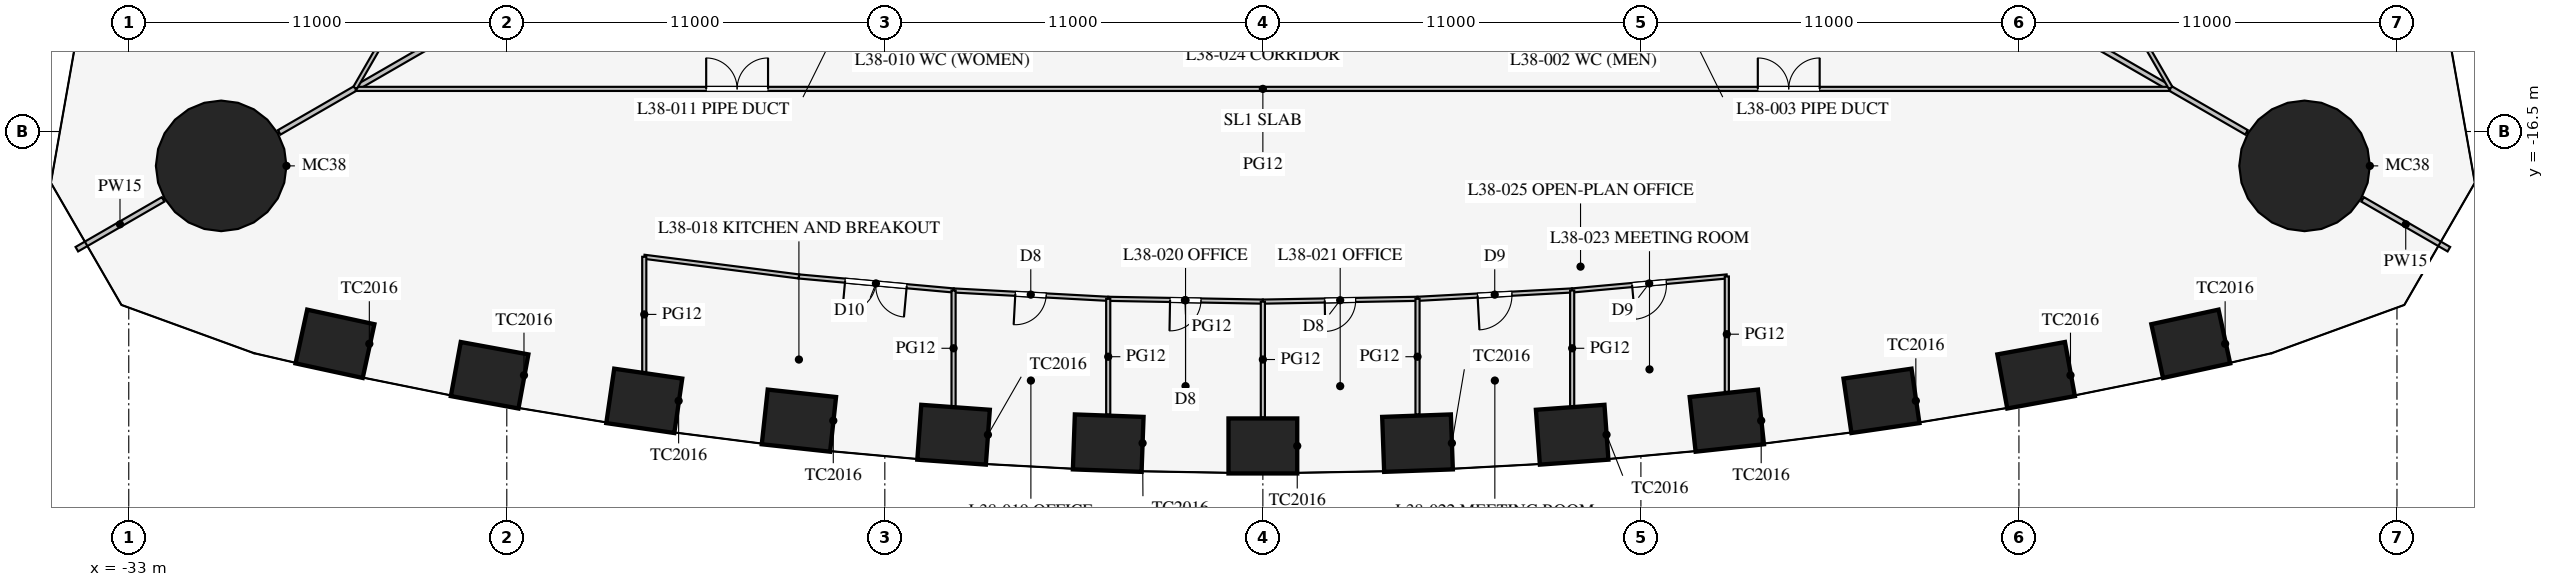
"""IFC4 building model, lengths in metres.
Left out: names, types, materials, properties, quantities, classifications, styles, units other than length and angle.
Written with IfcOpenShell. Run it as: python <this file> out.ifc"""

import sys

from ifc_helpers import new_model, si_unit, direction, frame, frame_2d, origin, origin_2d, place, context, subcontext, project, spatial, rectangle, circle, extrude, element, fill, save


model = new_model("IFC4")
c1 = context("Model", 3, precision=1e-05, world=origin(), true_north=direction((0.0, 1.0)))
c2 = subcontext(c1, "Body", "Model", "MODEL_VIEW")
j1 = project(units=[si_unit("LENGTHUNIT", "METRE"), si_unit("PLANEANGLEUNIT", "RADIAN")], contexts=[c1])
p1 = place(None, origin())
s1 = spatial("IfcSite", under=j1, at=p1, CompositionType="ELEMENT")
p2 = place(p1, origin())
s2 = spatial("IfcBuilding", under=s1, at=p2, CompositionType="ELEMENT")
p3 = place(p2, frame((0.0, 0.0, 166.1)))
s3 = spatial("IfcBuildingStorey", under=s2, at=p3, CompositionType="ELEMENT", Elevation=166.1)
for number, where, z_axis, x_axis in (
    (1, (-27.0, -22.677, 0.0), (0.0, 0.0, 1.0), (0.977, -0.212, 0.0)),
    (2, (-22.5, -23.593, 0.0), (0.0, 0.0, 1.0), (0.984, -0.18, 0.0)),
    (3, (-18.0, -24.337, 0.0), (0.0, 0.0, 1.0), (0.99, -0.144, 0.0)),
    (4, (-13.5, -24.913, 0.0), (0.0, 0.0, 1.0), (0.994, -0.108, 0.0)),
    (5, (-9.0, -25.323, 0.0), (0.0, 0.0, 1.0), (0.997, -0.072, 0.0)),
    (6, (-4.5, -25.568, 0.0), (0.0, 0.0, 1.0), (0.999, -0.036, 0.0)),
    (7, (0.0, -25.65, 0.0), (0.0, 0.0, 1.0), (1.0, 0.0, 0.0)),
    (8, (4.5, -25.568, 0.0), (0.0, 0.0, 1.0), (0.999, 0.036, 0.0)),
    (9, (9.0, -25.323, 0.0), (0.0, 0.0, 1.0), (0.997, 0.072, 0.0)),
    (10, (13.5, -24.913, 0.0), (0.0, 0.0, 1.0), (0.994, 0.108, 0.0)),
    (11, (18.0, -24.337, 0.0), (0.0, 0.0, 1.0), (0.99, 0.144, 0.0)),
    (12, (22.5, -23.593, 0.0), (0.0, 0.0, 1.0), (0.984, 0.18, 0.0)),
    (13, (27.0, -22.677, 0.0), (0.0, 0.0, 1.0), (0.977, 0.212, 0.0)),
):
    element("IfcColumn", number, at=place(p3, frame(where, z_axis=z_axis, x_axis=x_axis)), inside=s3, PredefinedType="COLUMN", context=c2, shape_type="SweptSolid", body=[
        extrude(rectangle(XDim=2.0, YDim=1.6, at=origin_2d()), origin(), (0.0, 0.0, 1.0), 4.2),
    ])
for number, where, z_axis, x_axis in (
    (14, (30.311, -17.5, 0.0), (0.0, 0.0, 1.0), (1.0, 0.0, 0.0)),
    (15, (-30.311, -17.5, 0.0), (0.0, 0.0, 1.0), (1.0, 0.0, 0.0)),
):
    element("IfcColumn", number, at=place(p3, frame(where, z_axis=z_axis, x_axis=x_axis)), inside=s3, PredefinedType="COLUMN", context=c2, shape_type="SweptSolid", body=[
        extrude(circle(Radius=1.9, at=origin_2d()), origin(), (0.0, 0.0, 1.0), 4.2),
    ])
p4 = place(p3, frame((14.203, -8.2, 0.0), z_axis=(0.0, 0.0, 1.0), x_axis=(0.866024668836, -0.500001272966, 0.0)))
e16 = element("IfcWall", 16, at=p4, inside=s3, PredefinedType="PARTITIONING", context=c2, shape_type="SweptSolid", body=[
    extrude(rectangle(XDim=16.65, YDim=0.15, at=frame_2d((8.325, 0.0))), origin(), (0.0, 0.0, 1.0), 2.3),
])
p5 = place(p3, frame((32.0, -18.475, 0.0), z_axis=(0.0, 0.0, 1.0), x_axis=(0.866042548026, -0.499970304126, 0.0)))
e17 = element("IfcWall", 17, at=p5, inside=s3, PredefinedType="PARTITIONING", context=c2, shape_type="SweptSolid", body=[
    extrude(rectangle(XDim=2.899, YDim=0.15, at=frame_2d((1.45, 0.0))), origin(), (0.0, 0.0, 1.0), 2.3),
])
p6 = place(p3, frame((-14.203, -8.2, 0.0), z_axis=(0.0, 0.0, 1.0), x_axis=(-0.866024668836, -0.500001272966, 0.0)))
e18 = element("IfcWall", 18, at=p6, inside=s3, PredefinedType="PARTITIONING", context=c2, shape_type="SweptSolid", body=[
    extrude(rectangle(XDim=16.65, YDim=0.15, at=frame_2d((8.325, 0.0))), origin(), (0.0, 0.0, 1.0), 2.3),
])
p7 = place(p3, frame((-32.0, -18.475, 0.0), z_axis=(0.0, 0.0, 1.0), x_axis=(-0.866042548026, -0.499970304126, 0.0)))
e19 = element("IfcWall", 19, at=p7, inside=s3, PredefinedType="PARTITIONING", context=c2, shape_type="SweptSolid", body=[
    extrude(rectangle(XDim=2.899, YDim=0.15, at=frame_2d((1.45, 0.0))), origin(), (0.0, 0.0, 1.0), 2.3),
])
p8 = place(p3, frame((-26.398, -15.26, 0.0), z_axis=(0.0, 0.0, 1.0), x_axis=(1.0, 0.0, 0.0)))
e20 = element("IfcWall", 20, at=p8, inside=s3, PredefinedType="PARTITIONING", context=c2, shape_type="SweptSolid", body=[
    extrude(rectangle(XDim=52.796, YDim=0.12, at=frame_2d((26.398, 0.0))), origin(), (0.0, 0.0, 1.0), 2.9),
])
p9 = place(p8, frame((10.2, 0.0, 0.15)))
e21 = element("IfcOpeningElement", 21, at=p9, cuts=e20, PredefinedType="OPENING", context=c2, shape_type="SweptSolid", body=[
    extrude(rectangle(XDim=1.8, YDim=2.1, at=frame_2d((0.9, 1.05))), frame((0.0, 0.07, 0.0), z_axis=(0.0, -1.0, 0.0), x_axis=(1.0, 0.0, 0.0)), (0.0, 0.0, 1.0), 0.14),
])
p10 = place(p8, frame((40.8, 0.0, 0.15)))
e22 = element("IfcOpeningElement", 22, at=p10, cuts=e20, PredefinedType="OPENING", context=c2, shape_type="SweptSolid", body=[
    extrude(rectangle(XDim=1.8, YDim=2.1, at=frame_2d((0.9, 1.05))), frame((0.0, 0.07, 0.0), z_axis=(0.0, -1.0, 0.0), x_axis=(1.0, 0.0, 0.0)), (0.0, 0.0, 1.0), 0.14),
])
p11 = place(p3, frame((0.0, -21.45, 0.0), z_axis=(0.0, 0.0, 1.0), x_axis=(0.999837820638, 0.018009231578, 0.0)))
e23 = element("IfcWall", 23, at=p11, inside=s3, PredefinedType="PARTITIONING", context=c2, shape_type="SweptSolid", body=[
    extrude(rectangle(XDim=4.501, YDim=0.12, at=frame_2d((2.25, 0.0))), origin(), (0.0, 0.0, 1.0), 2.9),
])
p12 = place(p11, frame((1.8, 0.0, 0.15)))
e24 = element("IfcOpeningElement", 24, at=p12, cuts=e23, PredefinedType="OPENING", context=c2, shape_type="SweptSolid", body=[
    extrude(rectangle(XDim=0.9, YDim=2.1, at=frame_2d((0.45, 1.05))), frame((0.0, 0.07, 0.0), z_axis=(0.0, -1.0, 0.0), x_axis=(1.0, 0.0, 0.0)), (0.0, 0.0, 1.0), 0.14),
])
p13 = place(p3, frame((4.5, -21.369, 0.0), z_axis=(0.0, 0.0, 1.0), x_axis=(0.998537376538, 0.054065771581, 0.0)))
e25 = element("IfcWall", 25, at=p13, inside=s3, PredefinedType="PARTITIONING", context=c2, shape_type="SweptSolid", body=[
    extrude(rectangle(XDim=4.507, YDim=0.12, at=frame_2d((2.253, 0.0))), origin(), (0.0, 0.0, 1.0), 2.9),
])
p14 = place(p13, frame((1.75, 0.0, 0.15)))
e26 = element("IfcOpeningElement", 26, at=p14, cuts=e25, PredefinedType="OPENING", context=c2, shape_type="SweptSolid", body=[
    extrude(rectangle(XDim=1.0, YDim=2.1, at=frame_2d((0.5, 1.05))), frame((0.0, 0.07, 0.0), z_axis=(0.0, -1.0, 0.0), x_axis=(1.0, 0.0, 0.0)), (0.0, 0.0, 1.0), 0.14),
])
p15 = place(p3, frame((9.0, -21.125, 0.0), z_axis=(0.0, 0.0, 1.0), x_axis=(0.995930325215, 0.090126507295, 0.0)))
e27 = element("IfcWall", 27, at=p15, inside=s3, PredefinedType="PARTITIONING", context=c2, shape_type="SweptSolid", body=[
    extrude(rectangle(XDim=4.518, YDim=0.12, at=frame_2d((2.259, 0.0))), origin(), (0.0, 0.0, 1.0), 2.9),
])
p16 = place(p15, frame((1.75, 0.0, 0.15)))
e28 = element("IfcOpeningElement", 28, at=p16, cuts=e27, PredefinedType="OPENING", context=c2, shape_type="SweptSolid", body=[
    extrude(rectangle(XDim=1.0, YDim=2.1, at=frame_2d((0.5, 1.05))), frame((0.0, 0.07, 0.0), z_axis=(0.0, -1.0, 0.0), x_axis=(1.0, 0.0, 0.0)), (0.0, 0.0, 1.0), 0.14),
])
p17 = place(p3, frame((-13.5, -20.718, 0.0), z_axis=(0.0, 0.0, 1.0), x_axis=(0.995930325215, -0.090126507295, 0.0)))
e29 = element("IfcWall", 29, at=p17, inside=s3, PredefinedType="PARTITIONING", context=c2, shape_type="SweptSolid", body=[
    extrude(rectangle(XDim=4.518, YDim=0.12, at=frame_2d((2.259, 0.0))), origin(), (0.0, 0.0, 1.0), 2.9),
])
p18 = place(p17, frame((1.35, 0.0, 0.15)))
e30 = element("IfcOpeningElement", 30, at=p18, cuts=e29, PredefinedType="OPENING", context=c2, shape_type="SweptSolid", body=[
    extrude(rectangle(XDim=1.8, YDim=2.1, at=frame_2d((0.9, 1.05))), frame((0.0, 0.07, 0.0), z_axis=(0.0, -1.0, 0.0), x_axis=(1.0, 0.0, 0.0)), (0.0, 0.0, 1.0), 0.14),
])
p19 = place(p3, frame((-18.0, -20.146, 0.0), z_axis=(0.0, 0.0, 1.0), x_axis=(0.992010652594, -0.12615413247, 0.0)))
e31 = element("IfcWall", 31, at=p19, inside=s3, PredefinedType="PARTITIONING", context=c2, shape_type="SweptSolid", body=[
    extrude(rectangle(XDim=4.536, YDim=0.12, at=frame_2d((2.268, 0.0))), origin(), (0.0, 0.0, 1.0), 2.9),
])
p20 = place(p3, frame((-4.5, -21.369, 0.0), z_axis=(0.0, 0.0, 1.0), x_axis=(0.999837820638, -0.018009231578, 0.0)))
e32 = element("IfcWall", 32, at=p20, inside=s3, PredefinedType="PARTITIONING", context=c2, shape_type="SweptSolid", body=[
    extrude(rectangle(XDim=4.501, YDim=0.12, at=frame_2d((2.25, 0.0))), origin(), (0.0, 0.0, 1.0), 2.9),
])
p21 = place(p20, frame((1.8, 0.0, 0.15)))
e33 = element("IfcOpeningElement", 33, at=p21, cuts=e32, PredefinedType="OPENING", context=c2, shape_type="SweptSolid", body=[
    extrude(rectangle(XDim=0.9, YDim=2.1, at=frame_2d((0.45, 1.05))), frame((0.0, 0.07, 0.0), z_axis=(0.0, -1.0, 0.0), x_axis=(1.0, 0.0, 0.0)), (0.0, 0.0, 1.0), 0.14),
])
p22 = place(p3, frame((-9.0, -21.125, 0.0), z_axis=(0.0, 0.0, 1.0), x_axis=(0.998537376538, -0.054065771581, 0.0)))
e34 = element("IfcWall", 34, at=p22, inside=s3, PredefinedType="PARTITIONING", context=c2, shape_type="SweptSolid", body=[
    extrude(rectangle(XDim=4.507, YDim=0.12, at=frame_2d((2.253, 0.0))), origin(), (0.0, 0.0, 1.0), 2.9),
])
p23 = place(p22, frame((1.8, 0.0, 0.15)))
e35 = element("IfcOpeningElement", 35, at=p23, cuts=e34, PredefinedType="OPENING", context=c2, shape_type="SweptSolid", body=[
    extrude(rectangle(XDim=0.9, YDim=2.1, at=frame_2d((0.45, 1.05))), frame((0.0, 0.07, 0.0), z_axis=(0.0, -1.0, 0.0), x_axis=(1.0, 0.0, 0.0)), (0.0, 0.0, 1.0), 0.14),
])
p24 = place(p3, frame((0.0, -21.45, 0.0), z_axis=(0.0, 0.0, 1.0), x_axis=(0.0, -1.0, 0.0)))
e36 = element("IfcWall", 36, at=p24, inside=s3, PredefinedType="PARTITIONING", context=c2, shape_type="SweptSolid", body=[
    extrude(rectangle(XDim=3.37, YDim=0.12, at=frame_2d((1.685, 0.0))), origin(), (0.0, 0.0, 1.0), 2.8),
])
p25 = place(p3, frame((13.5, -20.718, 0.0), z_axis=(0.0, 0.0, 1.0), x_axis=(0.0, -1.0, 0.0)))
e37 = element("IfcWall", 37, at=p25, inside=s3, PredefinedType="PARTITIONING", context=c2, shape_type="SweptSolid", body=[
    extrude(rectangle(XDim=3.36, YDim=0.12, at=frame_2d((1.68, 0.0))), origin(), (0.0, 0.0, 1.0), 2.6),
])
p26 = place(p3, frame((4.5, -21.369, 0.0), z_axis=(0.0, 0.0, 1.0), x_axis=(0.0, -1.0, 0.0)))
e38 = element("IfcWall", 38, at=p26, inside=s3, PredefinedType="PARTITIONING", context=c2, shape_type="SweptSolid", body=[
    extrude(rectangle(XDim=3.369, YDim=0.12, at=frame_2d((1.685, 0.0))), origin(), (0.0, 0.0, 1.0), 2.8),
])
p27 = place(p3, frame((9.0, -21.125, 0.0), z_axis=(0.0, 0.0, 1.0), x_axis=(0.0, -1.0, 0.0)))
e39 = element("IfcWall", 39, at=p27, inside=s3, PredefinedType="PARTITIONING", context=c2, shape_type="SweptSolid", body=[
    extrude(rectangle(XDim=3.366, YDim=0.12, at=frame_2d((1.683, 0.0))), origin(), (0.0, 0.0, 1.0), 2.9),
])
p28 = place(p3, frame((-18.0, -20.146, 0.0), z_axis=(0.0, 0.0, 1.0), x_axis=(0.0, -1.0, 0.0)))
e40 = element("IfcWall", 40, at=p28, inside=s3, PredefinedType="PARTITIONING", context=c2, shape_type="SweptSolid", body=[
    extrude(rectangle(XDim=3.353, YDim=0.12, at=frame_2d((1.677, 0.0))), origin(), (0.0, 0.0, 1.0), 2.8),
])
p29 = place(p3, frame((-4.5, -21.369, 0.0), z_axis=(0.0, 0.0, 1.0), x_axis=(0.0, -1.0, 0.0)))
e41 = element("IfcWall", 41, at=p29, inside=s3, PredefinedType="PARTITIONING", context=c2, shape_type="SweptSolid", body=[
    extrude(rectangle(XDim=3.369, YDim=0.12, at=frame_2d((1.685, 0.0))), origin(), (0.0, 0.0, 1.0), 2.8),
])
p30 = place(p3, frame((-9.0, -21.125, 0.0), z_axis=(0.0, 0.0, 1.0), x_axis=(0.0, -1.0, 0.0)))
e42 = element("IfcWall", 42, at=p30, inside=s3, PredefinedType="PARTITIONING", context=c2, shape_type="SweptSolid", body=[
    extrude(rectangle(XDim=3.366, YDim=0.12, at=frame_2d((1.683, 0.0))), origin(), (0.0, 0.0, 1.0), 2.9),
])
p31 = place(p3, frame((26.415, -15.231, 0.0), z_axis=(0.0, 0.0, 1.0), x_axis=(-0.50000091641, 0.866024874695, 0.0)))
e43 = element("IfcWall", 43, at=p31, inside=s3, PredefinedType="PARTITIONING", context=c2, shape_type="SweptSolid", body=[
    extrude(rectangle(XDim=52.796, YDim=0.12, at=frame_2d((26.398, 0.0))), origin(), (0.0, 0.0, 1.0), 2.9),
])
p32 = place(p31, frame((10.2, 0.0, 0.15)))
e44 = element("IfcOpeningElement", 44, at=p32, cuts=e43, PredefinedType="OPENING", context=c2, shape_type="SweptSolid", body=[
    extrude(rectangle(XDim=1.8, YDim=2.1, at=frame_2d((0.9, 1.05))), frame((0.0, 0.07, 0.0), z_axis=(0.0, -1.0, 0.0), x_axis=(1.0, 0.0, 0.0)), (0.0, 0.0, 1.0), 0.14),
])
p33 = place(p31, frame((40.8, 0.0, 0.15)))
e45 = element("IfcOpeningElement", 45, at=p33, cuts=e43, PredefinedType="OPENING", context=c2, shape_type="SweptSolid", body=[
    extrude(rectangle(XDim=1.8, YDim=2.1, at=frame_2d((0.9, 1.05))), frame((0.0, 0.07, 0.0), z_axis=(0.0, -1.0, 0.0), x_axis=(1.0, 0.0, 0.0)), (0.0, 0.0, 1.0), 0.14),
])
p34 = place(p3, frame((-0.016, 30.491, 0.0), z_axis=(0.0, 0.0, 1.0), x_axis=(-0.50000091641, -0.866024874695, 0.0)))
e46 = element("IfcWall", 46, at=p34, inside=s3, PredefinedType="PARTITIONING", context=c2, shape_type="SweptSolid", body=[
    extrude(rectangle(XDim=52.796, YDim=0.12, at=frame_2d((26.398, 0.0))), origin(), (0.0, 0.0, 1.0), 2.9),
])
p35 = place(p34, frame((10.2, 0.0, 0.15)))
e47 = element("IfcOpeningElement", 47, at=p35, cuts=e46, PredefinedType="OPENING", context=c2, shape_type="SweptSolid", body=[
    extrude(rectangle(XDim=1.8, YDim=2.1, at=frame_2d((0.9, 1.05))), frame((0.0, 0.07, 0.0), z_axis=(0.0, -1.0, 0.0), x_axis=(1.0, 0.0, 0.0)), (0.0, 0.0, 1.0), 0.14),
])
p36 = place(p34, frame((40.8, 0.0, 0.15)))
e48 = element("IfcOpeningElement", 48, at=p36, cuts=e46, PredefinedType="OPENING", context=c2, shape_type="SweptSolid", body=[
    extrude(rectangle(XDim=1.8, YDim=2.1, at=frame_2d((0.9, 1.05))), frame((0.0, 0.07, 0.0), z_axis=(0.0, -1.0, 0.0), x_axis=(1.0, 0.0, 0.0)), (0.0, 0.0, 1.0), 0.14),
])
p37 = place(p18, frame((1.8, 0.0, 0.0), z_axis=(0.0, 0.0, 1.0), x_axis=(-1.0, 0.0, 0.0)))
e49 = element("IfcDoor", 49, at=p37, inside=s3, OperationType="DOUBLE_DOOR_SINGLE_SWING", PredefinedType="DOOR", context=c2, shape_type="SweptSolid", body=[
    extrude(rectangle(XDim=1.8, YDim=2.1, at=frame_2d((0.9, 1.05))), frame((0.0, 0.025, 0.0), z_axis=(0.0, -1.0, 0.0), x_axis=(1.0, 0.0, 0.0)), (0.0, 0.0, 1.0), 0.05),
])
fill(e30, e49)
p38 = place(p23, frame((0.9, 0.0, 0.0), z_axis=(0.0, 0.0, 1.0), x_axis=(-1.0, 0.0, 0.0)))
e50 = element("IfcDoor", 50, at=p38, inside=s3, OperationType="SINGLE_SWING_RIGHT", PredefinedType="DOOR", context=c2, shape_type="SweptSolid", body=[
    extrude(rectangle(XDim=0.9, YDim=2.1, at=frame_2d((0.45, 1.05))), frame((0.0, 0.025, 0.0), z_axis=(0.0, -1.0, 0.0), x_axis=(1.0, 0.0, 0.0)), (0.0, 0.0, 1.0), 0.05),
])
fill(e35, e50)
p39 = place(p21, frame((0.9, 0.0, 0.0), z_axis=(0.0, 0.0, 1.0), x_axis=(-1.0, 0.0, 0.0)))
e51 = element("IfcDoor", 51, at=p39, inside=s3, OperationType="SINGLE_SWING_RIGHT", PredefinedType="DOOR", context=c2, shape_type="SweptSolid", body=[
    extrude(rectangle(XDim=0.9, YDim=2.1, at=frame_2d((0.45, 1.05))), frame((0.0, 0.025, 0.0), z_axis=(0.0, -1.0, 0.0), x_axis=(1.0, 0.0, 0.0)), (0.0, 0.0, 1.0), 0.05),
])
fill(e33, e51)
p40 = place(p12, frame((0.9, 0.0, 0.0), z_axis=(0.0, 0.0, 1.0), x_axis=(-1.0, 0.0, 0.0)))
e52 = element("IfcDoor", 52, at=p40, inside=s3, OperationType="SINGLE_SWING_RIGHT", PredefinedType="DOOR", context=c2, shape_type="SweptSolid", body=[
    extrude(rectangle(XDim=0.9, YDim=2.1, at=frame_2d((0.45, 1.05))), frame((0.0, 0.025, 0.0), z_axis=(0.0, -1.0, 0.0), x_axis=(1.0, 0.0, 0.0)), (0.0, 0.0, 1.0), 0.05),
])
fill(e24, e52)
p41 = place(p14, frame((1.0, 0.0, 0.0), z_axis=(0.0, 0.0, 1.0), x_axis=(-1.0, 0.0, 0.0)))
e53 = element("IfcDoor", 53, at=p41, inside=s3, OperationType="SINGLE_SWING_RIGHT", PredefinedType="DOOR", context=c2, shape_type="SweptSolid", body=[
    extrude(rectangle(XDim=1.0, YDim=2.1, at=frame_2d((0.5, 1.05))), frame((0.0, 0.025, 0.0), z_axis=(0.0, -1.0, 0.0), x_axis=(1.0, 0.0, 0.0)), (0.0, 0.0, 1.0), 0.05),
])
fill(e26, e53)
p42 = place(p16, frame((1.0, 0.0, 0.0), z_axis=(0.0, 0.0, 1.0), x_axis=(-1.0, 0.0, 0.0)))
e54 = element("IfcDoor", 54, at=p42, inside=s3, OperationType="SINGLE_SWING_RIGHT", PredefinedType="DOOR", context=c2, shape_type="SweptSolid", body=[
    extrude(rectangle(XDim=1.0, YDim=2.1, at=frame_2d((0.5, 1.05))), frame((0.0, 0.025, 0.0), z_axis=(0.0, -1.0, 0.0), x_axis=(1.0, 0.0, 0.0)), (0.0, 0.0, 1.0), 0.05),
])
fill(e28, e54)
p43 = place(p9, origin())
e55 = element("IfcDoor", 55, at=p43, inside=s3, OperationType="DOUBLE_DOOR_SINGLE_SWING", PredefinedType="DOOR", context=c2, shape_type="SweptSolid", body=[
    extrude(rectangle(XDim=1.8, YDim=2.1, at=frame_2d((0.9, 1.05))), frame((0.0, 0.025, 0.0), z_axis=(0.0, -1.0, 0.0), x_axis=(1.0, 0.0, 0.0)), (0.0, 0.0, 1.0), 0.05),
])
fill(e21, e55)
p44 = place(p10, origin())
e56 = element("IfcDoor", 56, at=p44, inside=s3, OperationType="DOUBLE_DOOR_SINGLE_SWING", PredefinedType="DOOR", context=c2, shape_type="SweptSolid", body=[
    extrude(rectangle(XDim=1.8, YDim=2.1, at=frame_2d((0.9, 1.05))), frame((0.0, 0.025, 0.0), z_axis=(0.0, -1.0, 0.0), x_axis=(1.0, 0.0, 0.0)), (0.0, 0.0, 1.0), 0.05),
])
fill(e22, e56)
save(model, sys.argv[1])
